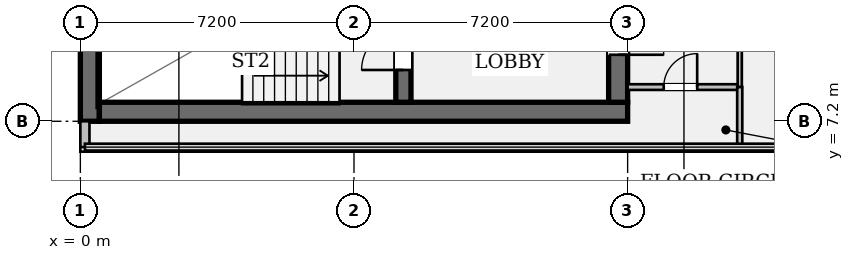
"""IFC4 building model, lengths in metres.
Left out: names, types, materials, properties, quantities, classifications, styles, units other than length and angle.
Written with IfcOpenShell. Run it as: python <this file> out.ifc"""

import sys

from ifc_helpers import new_model, si_unit, direction, frame, frame_2d, origin, place, context, subcontext, project, spatial, rectangle, extrude, element, fill, save


model = new_model("IFC4")
c1 = context("Model", 3, precision=1e-05, world=origin(), true_north=direction((0.0, 1.0)))
c2 = subcontext(c1, "Body", "Model", "MODEL_VIEW")
j1 = project(units=[si_unit("LENGTHUNIT", "METRE"), si_unit("PLANEANGLEUNIT", "RADIAN")], contexts=[c1])
p1 = place(None, origin())
s1 = spatial("IfcSite", under=j1, at=p1, CompositionType="ELEMENT")
p2 = place(p1, origin())
s2 = spatial("IfcBuilding", under=s1, at=p2, CompositionType="ELEMENT")
p3 = place(p2, frame((0.0, 0.0, 241.15)))
s3 = spatial("IfcBuildingStorey", under=s2, at=p3, CompositionType="ELEMENT", Elevation=241.15)
p4 = place(p3, frame((0.25, 7.2, 0.0), z_axis=(0.0, 0.0, 1.0), x_axis=(0.0, 1.0, 0.0)))
e1 = element("IfcWall", 1, at=p4, inside=s3, PredefinedType="SHEAR", context=c2, shape_type="SweptSolid", body=[
    extrude(rectangle(XDim=28.8, YDim=0.5, at=frame_2d((14.4, 0.0))), origin(), (0.0, 0.0, 1.0), 3.24),
])
p5 = place(p3, frame((0.5, 7.45, 0.0), z_axis=(0.0, 0.0, 1.0), x_axis=(1.0, 0.0, 0.0)))
e2 = element("IfcWall", 2, at=p5, inside=s3, PredefinedType="SHEAR", context=c2, shape_type="SweptSolid", body=[
    extrude(rectangle(XDim=13.9, YDim=0.5, at=frame_2d((6.95, 0.0))), origin(), (0.0, 0.0, 1.0), 3.24),
])
p6 = place(p3, frame((14.15, 35.5, 0.0), z_axis=(0.0, 0.0, 1.0), x_axis=(0.0, -1.0, 0.0)))
e3 = element("IfcWall", 3, at=p6, inside=s3, PredefinedType="SHEAR", context=c2, shape_type="SweptSolid", body=[
    extrude(rectangle(XDim=27.8, YDim=0.5, at=frame_2d((13.9, 0.0))), origin(), (0.0, 0.0, 1.0), 3.24),
])
p7 = place(p6, frame((1.4, 0.0, 0.0)))
e4 = element("IfcOpeningElement", 4, at=p7, cuts=e3, PredefinedType="OPENING", context=c2, shape_type="SweptSolid", body=[
    extrude(rectangle(XDim=1.2, YDim=2.15, at=frame_2d((0.6, 1.075))), frame((0.0, 0.262, 0.0), z_axis=(0.0, -1.0, 0.0), x_axis=(1.0, 0.0, 0.0)), (0.0, 0.0, 1.0), 0.524),
])
p8 = place(p6, frame((25.35, 0.0, 0.0)))
e5 = element("IfcOpeningElement", 5, at=p8, cuts=e3, PredefinedType="OPENING", context=c2, shape_type="SweptSolid", body=[
    extrude(rectangle(XDim=1.2, YDim=2.15, at=frame_2d((0.6, 1.075))), frame((0.0, 0.262, 0.0), z_axis=(0.0, -1.0, 0.0), x_axis=(1.0, 0.0, 0.0)), (0.0, 0.0, 1.0), 0.524),
])
p9 = place(p6, frame((14.7, 0.0, 0.0)))
e6 = element("IfcOpeningElement", 6, at=p9, cuts=e3, PredefinedType="OPENING", context=c2, shape_type="SweptSolid", body=[
    extrude(rectangle(XDim=1.6, YDim=2.2, at=frame_2d((0.8, 1.1))), frame((0.0, 0.262, 0.0), z_axis=(0.0, -1.0, 0.0), x_axis=(1.0, 0.0, 0.0)), (0.0, 0.0, 1.0), 0.524),
])
p10 = place(p3, frame((8.5, 7.7, 0.0), z_axis=(0.0, 0.0, 1.0), x_axis=(0.0, 1.0, 0.0)))
e7 = element("IfcWall", 7, at=p10, inside=s3, PredefinedType="SHEAR", context=c2, shape_type="SweptSolid", body=[
    extrude(rectangle(XDim=3.78, YDim=0.4, at=frame_2d((1.89, 0.0))), origin(), (0.0, 0.0, 1.0), 3.24),
])
p11 = place(p10, frame((0.85, 0.0, 0.0)))
e8 = element("IfcOpeningElement", 8, at=p11, cuts=e7, PredefinedType="OPENING", context=c2, shape_type="SweptSolid", body=[
    extrude(rectangle(XDim=1.1, YDim=2.15, at=frame_2d((0.55, 1.075))), frame((0.0, 0.212, 0.0), z_axis=(0.0, -1.0, 0.0), x_axis=(1.0, 0.0, 0.0)), (0.0, 0.0, 1.0), 0.424),
])
p12 = place(p3, frame((0.12, 6.52, 0.0), z_axis=(0.0, 0.0, 1.0), x_axis=(0.0, 1.0, 0.0)))
e9 = element("IfcWall", 9, at=p12, inside=s3, PredefinedType="STANDARD", context=c2, shape_type="SweptSolid", body=[
    extrude(rectangle(XDim=0.68, YDim=0.24, at=frame_2d((0.34, 0.0))), origin(), (0.0, 0.0, 1.0), 3.24),
])
p13 = place(p3, frame((14.4, 8.1, 0.0), z_axis=(0.0, 0.0, 1.0), x_axis=(1.0, 0.0, 0.0)))
e10 = element("IfcWall", 10, at=p13, inside=s3, PredefinedType="PARTITIONING", context=c2, shape_type="SweptSolid", body=[
    extrude(rectangle(XDim=2.95, YDim=0.15, at=frame_2d((1.475, 0.0))), origin(), (0.0, 0.0, 1.0), 3.24),
])
p14 = place(p13, frame((0.95, 0.0, 0.0)))
e11 = element("IfcOpeningElement", 11, at=p14, cuts=e10, PredefinedType="OPENING", context=c2, shape_type="SweptSolid", body=[
    extrude(rectangle(XDim=0.88, YDim=2.15, at=frame_2d((0.44, 1.075))), frame((0.0, 0.087, 0.0), z_axis=(0.0, -1.0, 0.0), x_axis=(1.0, 0.0, 0.0)), (0.0, 0.0, 1.0), 0.174),
])
p15 = place(p3, frame((17.35, 8.1, 0.0), z_axis=(0.0, 0.0, 1.0), x_axis=(0.0, 1.0, 0.0)))
e12 = element("IfcWall", 12, at=p15, inside=s3, PredefinedType="PARTITIONING", context=c2, shape_type="SweptSolid", body=[
    extrude(rectangle(XDim=2.2, YDim=0.11, at=frame_2d((1.1, 0.0))), origin(), (0.0, 0.0, 1.0), 3.24),
])
p16 = place(p3, frame((17.35, 6.52, 0.0), z_axis=(0.0, 0.0, 1.0), x_axis=(0.0, 1.0, 0.0)))
e13 = element("IfcWall", 13, at=p16, inside=s3, PredefinedType="PARTITIONING", context=c2, shape_type="SweptSolid", body=[
    extrude(rectangle(XDim=1.58, YDim=0.135, at=frame_2d((0.79, 0.0))), origin(), (0.0, 0.0, 1.0), 3.24),
])
p17 = place(p11, origin())
e14 = element("IfcDoor", 14, at=p17, inside=s3, OperationType="SINGLE_SWING_LEFT", PredefinedType="DOOR", context=c2, shape_type="SweptSolid", body=[
    extrude(rectangle(XDim=1.1, YDim=2.15, at=frame_2d((0.55, 1.075))), frame((0.0, 0.025, 0.0), z_axis=(0.0, -1.0, 0.0), x_axis=(1.0, 0.0, 0.0)), (0.0, 0.0, 1.0), 0.05),
])
fill(e8, e14)
p18 = place(p8, origin())
e15 = element("IfcDoor", 15, at=p18, inside=s3, OperationType="SINGLE_SWING_RIGHT", PredefinedType="DOOR", context=c2, shape_type="SweptSolid", body=[
    extrude(rectangle(XDim=1.2, YDim=2.15, at=frame_2d((0.6, 1.075))), frame((0.0, 0.025, 0.0), z_axis=(0.0, -1.0, 0.0), x_axis=(1.0, 0.0, 0.0)), (0.0, 0.0, 1.0), 0.05),
])
fill(e5, e15)
p19 = place(p14, origin())
e16 = element("IfcDoor", 16, at=p19, inside=s3, OperationType="SINGLE_SWING_RIGHT", PredefinedType="DOOR", context=c2, shape_type="SweptSolid", body=[
    extrude(rectangle(XDim=0.88, YDim=2.15, at=frame_2d((0.44, 1.075))), frame((0.0, 0.025, 0.0), z_axis=(0.0, -1.0, 0.0), x_axis=(1.0, 0.0, 0.0)), (0.0, 0.0, 1.0), 0.05),
])
fill(e11, e16)
save(model, sys.argv[1])
